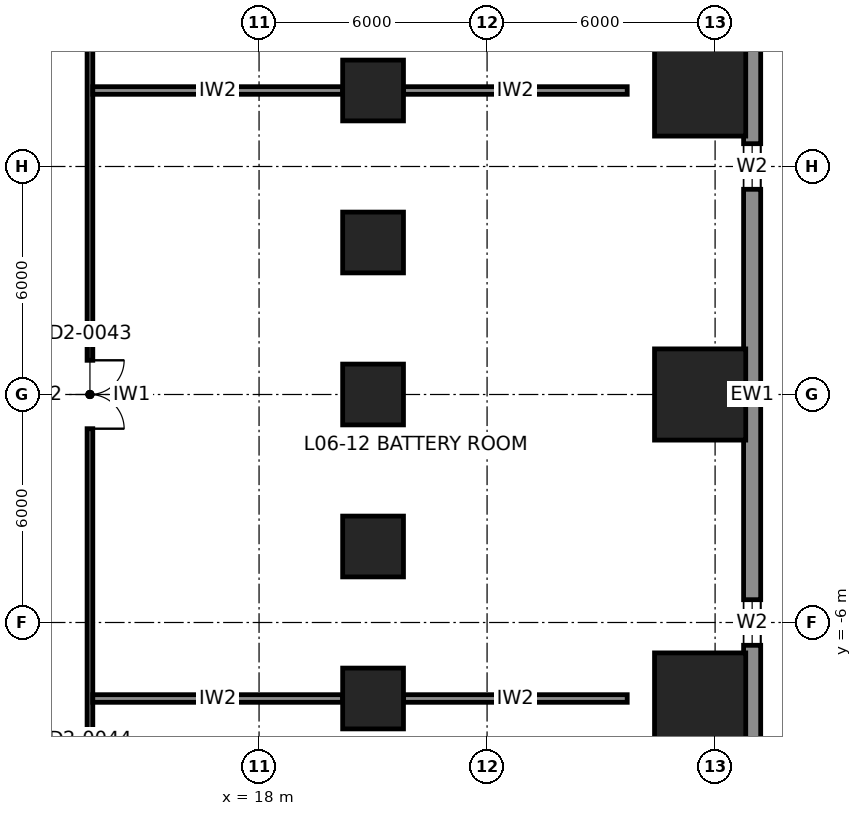
"""IFC4 building model, lengths in metres.
Left out: names, types, materials, properties, quantities, classifications, styles, units other than length and angle.
Written with IfcOpenShell. Run it as: python <this file> out.ifc"""

import sys

from ifc_helpers import new_model, si_unit, direction, frame, frame_2d, origin, origin_2d, place, context, subcontext, project, spatial, rectangle, extrude, element, fill, save


model = new_model("IFC4")
c1 = context("Model", 3, precision=1e-05, world=origin(), true_north=direction((0.0, 1.0)))
c2 = subcontext(c1, "Body", "Model", "MODEL_VIEW")
j1 = project(units=[si_unit("LENGTHUNIT", "METRE"), si_unit("PLANEANGLEUNIT", "RADIAN")], contexts=[c1])
p1 = place(None, origin())
s1 = spatial("IfcSite", under=j1, at=p1, CompositionType="ELEMENT")
p2 = place(p1, origin())
s2 = spatial("IfcBuilding", under=s1, at=p2, CompositionType="ELEMENT")
p3 = place(p2, frame((0.0, 0.0, 32.0)))
s3 = spatial("IfcBuildingStorey", under=s2, at=p3, CompositionType="ELEMENT", Elevation=32.0)
for number, where, z_axis, x_axis in (
    (1, (29.606, 0.0, 0.0), (-0.04, 0.0, 0.999), (0.0, -1.0, 0.0)),
    (2, (29.606, -8.0, 0.0), (-0.04, 0.0, 0.999), (0.0, -1.0, 0.0)),
    (3, (29.606, 8.0, 0.0), (-0.04, 0.0, 0.999), (0.0, -1.0, 0.0)),
):
    element("IfcColumn", number, at=place(p3, frame(where, z_axis=z_axis, x_axis=x_axis)), inside=s3, PredefinedType="COLUMN", context=c2, shape_type="SweptSolid", body=[
        extrude(rectangle(XDim=2.4, YDim=2.4, at=origin_2d()), origin(), (0.0, 0.0, 1.0), 5.504),
    ])
for number, where, z_axis, x_axis in (
    (4, (21.0, 0.0, 0.0), (0.0, 0.0, 1.0), (1.0, 0.0, 0.0)),
    (5, (21.0, -4.0, 0.0), (0.0, 0.0, 1.0), (1.0, 0.0, 0.0)),
    (6, (21.0, 4.0, 0.0), (0.0, 0.0, 1.0), (1.0, 0.0, 0.0)),
    (7, (21.0, -8.0, 0.0), (0.0, 0.0, 1.0), (1.0, 0.0, 0.0)),
    (8, (21.0, 8.0, 0.0), (0.0, 0.0, 1.0), (1.0, 0.0, 0.0)),
):
    element("IfcColumn", number, at=place(p3, frame(where, z_axis=z_axis, x_axis=x_axis)), inside=s3, PredefinedType="COLUMN", context=c2, shape_type="SweptSolid", body=[
        extrude(rectangle(XDim=1.6, YDim=1.6, at=origin_2d()), origin(), (0.0, 0.0, 1.0), 5.5),
    ])
p4 = place(p3, frame((30.975, -26.7, 0.0), z_axis=(0.0, 0.0, 1.0), x_axis=(0.0, 1.0, 0.0)))
e9 = element("IfcWall", 9, at=p4, inside=s3, PredefinedType="SOLIDWALL", context=c2, shape_type="SweptSolid", body=[
    extrude(rectangle(XDim=53.4, YDim=0.45, at=frame_2d((26.7, 0.0))), origin(), (0.0, 0.0, 1.0), 5.3),
])
p5 = place(p4, frame((8.1, 0.0, 0.9)))
e10 = element("IfcOpeningElement", 10, at=p5, cuts=e9, PredefinedType="OPENING", context=c2, shape_type="SweptSolid", body=[
    extrude(rectangle(XDim=1.2, YDim=2.0, at=frame_2d((0.6, 1.0))), frame((0.0, 0.235, 0.0), z_axis=(0.0, -1.0, 0.0), x_axis=(1.0, 0.0, 0.0)), (0.0, 0.0, 1.0), 0.47),
])
p6 = place(p4, frame((14.1, 0.0, 0.9)))
e11 = element("IfcOpeningElement", 11, at=p6, cuts=e9, PredefinedType="OPENING", context=c2, shape_type="SweptSolid", body=[
    extrude(rectangle(XDim=1.2, YDim=2.0, at=frame_2d((0.6, 1.0))), frame((0.0, 0.235, 0.0), z_axis=(0.0, -1.0, 0.0), x_axis=(1.0, 0.0, 0.0)), (0.0, 0.0, 1.0), 0.47),
])
p7 = place(p4, frame((20.1, 0.0, 0.9)))
e12 = element("IfcOpeningElement", 12, at=p7, cuts=e9, PredefinedType="OPENING", context=c2, shape_type="SweptSolid", body=[
    extrude(rectangle(XDim=1.2, YDim=2.0, at=frame_2d((0.6, 1.0))), frame((0.0, 0.235, 0.0), z_axis=(0.0, -1.0, 0.0), x_axis=(1.0, 0.0, 0.0)), (0.0, 0.0, 1.0), 0.47),
])
p8 = place(p4, frame((32.1, 0.0, 0.9)))
e13 = element("IfcOpeningElement", 13, at=p8, cuts=e9, PredefinedType="OPENING", context=c2, shape_type="SweptSolid", body=[
    extrude(rectangle(XDim=1.2, YDim=2.0, at=frame_2d((0.6, 1.0))), frame((0.0, 0.235, 0.0), z_axis=(0.0, -1.0, 0.0), x_axis=(1.0, 0.0, 0.0)), (0.0, 0.0, 1.0), 0.47),
])
p9 = place(p4, frame((38.1, 0.0, 0.9)))
e14 = element("IfcOpeningElement", 14, at=p9, cuts=e9, PredefinedType="OPENING", context=c2, shape_type="SweptSolid", body=[
    extrude(rectangle(XDim=1.2, YDim=2.0, at=frame_2d((0.6, 1.0))), frame((0.0, 0.235, 0.0), z_axis=(0.0, -1.0, 0.0), x_axis=(1.0, 0.0, 0.0)), (0.0, 0.0, 1.0), 0.47),
])
p10 = place(p4, frame((44.1, 0.0, 0.9)))
e15 = element("IfcOpeningElement", 15, at=p10, cuts=e9, PredefinedType="OPENING", context=c2, shape_type="SweptSolid", body=[
    extrude(rectangle(XDim=1.2, YDim=2.0, at=frame_2d((0.6, 1.0))), frame((0.0, 0.235, 0.0), z_axis=(0.0, -1.0, 0.0), x_axis=(1.0, 0.0, 0.0)), (0.0, 0.0, 1.0), 0.47),
])
p11 = place(p3, frame((13.55, -13.475, 0.0), z_axis=(0.0, 0.0, 1.0), x_axis=(0.0, 1.0, 0.0)))
e16 = element("IfcWall", 16, at=p11, inside=s3, PredefinedType="PARTITIONING", context=c2, shape_type="SweptSolid", body=[
    extrude(rectangle(XDim=26.95, YDim=0.15, at=frame_2d((13.475, 0.0))), origin(), (0.0, 0.0, 1.0), 5.3),
])
p12 = place(p11, frame((1.875, 0.0, 0.0)))
e17 = element("IfcOpeningElement", 17, at=p12, cuts=e16, PredefinedType="OPENING", context=c2, shape_type="SweptSolid", body=[
    extrude(rectangle(XDim=1.8, YDim=2.3, at=frame_2d((0.9, 1.15))), frame((0.0, 0.085, 0.0), z_axis=(0.0, -1.0, 0.0), x_axis=(1.0, 0.0, 0.0)), (0.0, 0.0, 1.0), 0.17),
])
p13 = place(p11, frame((12.575, 0.0, 0.0)))
e18 = element("IfcOpeningElement", 18, at=p13, cuts=e16, PredefinedType="OPENING", context=c2, shape_type="SweptSolid", body=[
    extrude(rectangle(XDim=1.8, YDim=2.3, at=frame_2d((0.9, 1.15))), frame((0.0, 0.085, 0.0), z_axis=(0.0, -1.0, 0.0), x_axis=(1.0, 0.0, 0.0)), (0.0, 0.0, 1.0), 0.17),
])
p14 = place(p11, frame((23.275, 0.0, 0.0)))
e19 = element("IfcOpeningElement", 19, at=p14, cuts=e16, PredefinedType="OPENING", context=c2, shape_type="SweptSolid", body=[
    extrude(rectangle(XDim=1.8, YDim=2.3, at=frame_2d((0.9, 1.15))), frame((0.0, 0.085, 0.0), z_axis=(0.0, -1.0, 0.0), x_axis=(1.0, 0.0, 0.0)), (0.0, 0.0, 1.0), 0.17),
])
p15 = place(p3, frame((13.625, -8.0, 0.0), z_axis=(0.0, 0.0, 1.0), x_axis=(1.0, 0.0, 0.0)))
e20 = element("IfcWall", 20, at=p15, inside=s3, PredefinedType="PARTITIONING", context=c2, shape_type="SweptSolid", body=[
    extrude(rectangle(XDim=6.575, YDim=0.2, at=frame_2d((3.288, 0.0))), origin(), (0.0, 0.0, 1.0), 4.731),
])
p16 = place(p3, frame((21.8, -8.0, 0.0), z_axis=(0.0, 0.0, 1.0), x_axis=(1.0, 0.0, 0.0)))
e21 = element("IfcWall", 21, at=p16, inside=s3, PredefinedType="PARTITIONING", context=c2, shape_type="SweptSolid", body=[
    extrude(rectangle(XDim=5.887, YDim=0.2, at=frame_2d((2.944, 0.0))), origin(), (0.0, 0.0, 1.0), 4.731),
])
p17 = place(p3, frame((13.625, 8.0, 0.0), z_axis=(0.0, 0.0, 1.0), x_axis=(1.0, 0.0, 0.0)))
e22 = element("IfcWall", 22, at=p17, inside=s3, PredefinedType="PARTITIONING", context=c2, shape_type="SweptSolid", body=[
    extrude(rectangle(XDim=6.575, YDim=0.2, at=frame_2d((3.288, 0.0))), origin(), (0.0, 0.0, 1.0), 4.731),
])
p18 = place(p3, frame((21.8, 8.0, 0.0), z_axis=(0.0, 0.0, 1.0), x_axis=(1.0, 0.0, 0.0)))
e23 = element("IfcWall", 23, at=p18, inside=s3, PredefinedType="PARTITIONING", context=c2, shape_type="SweptSolid", body=[
    extrude(rectangle(XDim=5.887, YDim=0.2, at=frame_2d((2.944, 0.0))), origin(), (0.0, 0.0, 1.0), 4.731),
])
p19 = place(p7, origin())
e24 = element("IfcWindow", 24, at=p19, inside=s3, PartitioningType="SINGLE_PANEL", PredefinedType="WINDOW", context=c2, shape_type="SweptSolid", body=[
    extrude(rectangle(XDim=1.2, YDim=2.0, at=frame_2d((0.6, 1.0))), frame((0.0, 0.03, 0.0), z_axis=(0.0, -1.0, 0.0), x_axis=(1.0, 0.0, 0.0)), (0.0, 0.0, 1.0), 0.06),
])
fill(e12, e24)
p20 = place(p8, origin())
e25 = element("IfcWindow", 25, at=p20, inside=s3, PartitioningType="SINGLE_PANEL", PredefinedType="WINDOW", context=c2, shape_type="SweptSolid", body=[
    extrude(rectangle(XDim=1.2, YDim=2.0, at=frame_2d((0.6, 1.0))), frame((0.0, 0.03, 0.0), z_axis=(0.0, -1.0, 0.0), x_axis=(1.0, 0.0, 0.0)), (0.0, 0.0, 1.0), 0.06),
])
fill(e13, e25)
p21 = place(p13, frame((1.8, 0.0, 0.0), z_axis=(0.0, 0.0, 1.0), x_axis=(-1.0, 0.0, 0.0)))
e26 = element("IfcDoor", 26, at=p21, inside=s3, OperationType="DOUBLE_DOOR_DOUBLE_SWING", PredefinedType="DOOR", context=c2, shape_type="SweptSolid", body=[
    extrude(rectangle(XDim=1.8, YDim=2.3, at=frame_2d((0.9, 1.15))), frame((0.0, 0.025, 0.0), z_axis=(0.0, -1.0, 0.0), x_axis=(1.0, 0.0, 0.0)), (0.0, 0.0, 1.0), 0.05),
])
fill(e18, e26)
save(model, sys.argv[1])
